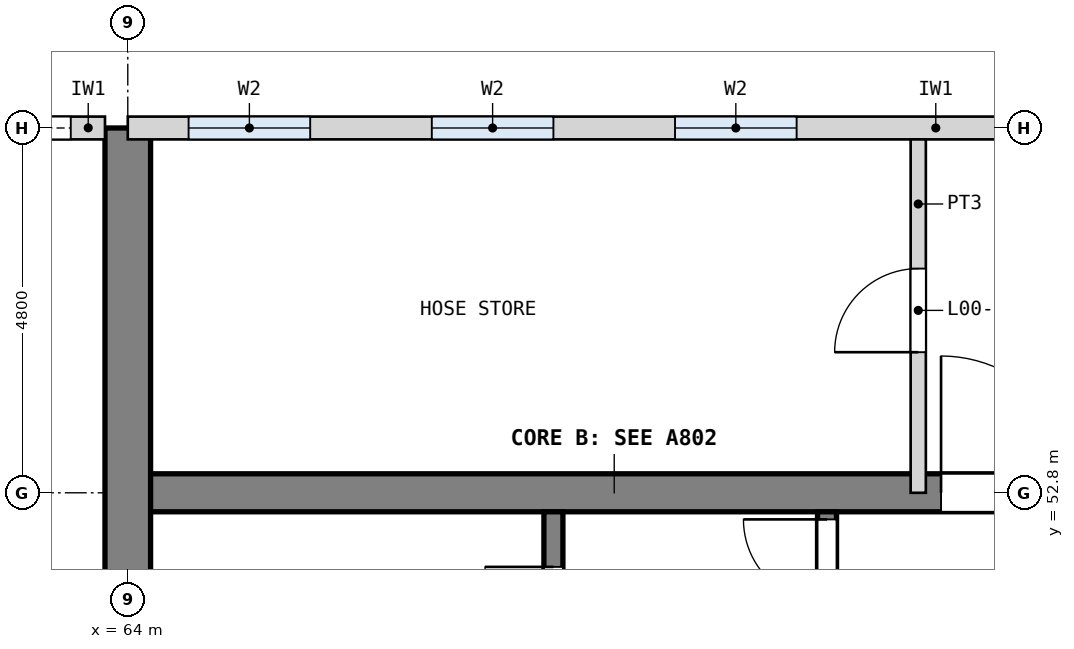
"""IFC4 building model, lengths in metres.
Left out: names, types, materials, properties, quantities, classifications, styles, units other than length and angle.
Written with IfcOpenShell. Run it as: python <this file> out.ifc"""

import sys

from ifc_helpers import new_model, si_unit, direction, frame, frame_2d, origin, place, context, subcontext, project, spatial, rectangle, extrude, element, fill, save


model = new_model("IFC4")
c1 = context("Model", 3, precision=1e-05, world=origin(), true_north=direction((0.0, 1.0)))
c2 = subcontext(c1, "Body", "Model", "MODEL_VIEW")
j1 = project(units=[si_unit("LENGTHUNIT", "METRE"), si_unit("PLANEANGLEUNIT", "RADIAN")], contexts=[c1])
p1 = place(None, origin())
s1 = spatial("IfcSite", under=j1, at=p1, CompositionType="ELEMENT")
p2 = place(p1, origin())
s2 = spatial("IfcBuilding", under=s1, at=p2, CompositionType="ELEMENT")
p3 = place(p2, origin())
s3 = spatial("IfcBuildingStorey", under=s2, at=p3, CompositionType="ELEMENT", Elevation=0.0)
p4 = place(p3, frame((63.75, 52.8, 0.0), z_axis=(0.0, 0.0, 1.0), x_axis=(1.0, 0.0, 0.0)))
e1 = element("IfcWall", 1, at=p4, inside=s3, PredefinedType="SHEAR", context=c2, shape_type="SweptSolid", body=[
    extrude(rectangle(XDim=13.3, YDim=0.5, at=frame_2d((6.65, 0.0))), origin(), (0.0, 0.0, 1.0), 4.2),
])
p5 = place(p4, frame((10.95, 0.0, 0.0)))
e2 = element("IfcOpeningElement", 2, at=p5, cuts=e1, PredefinedType="OPENING", context=c2, shape_type="SweptSolid", body=[
    extrude(rectangle(XDim=1.8, YDim=2.1, at=frame_2d((0.9, 1.05))), frame((0.0, 0.26, 0.0), z_axis=(0.0, -1.0, 0.0), x_axis=(1.0, 0.0, 0.0)), (0.0, 0.0, 1.0), 0.52),
])
p6 = place(p3, frame((64.0, 28.8, 0.0), z_axis=(0.0, 0.0, 1.0), x_axis=(0.0, 1.0, 0.0)))
e3 = element("IfcWall", 3, at=p6, inside=s3, PredefinedType="SHEAR", context=c2, shape_type="SweptSolid", body=[
    extrude(rectangle(XDim=28.8, YDim=0.6, at=frame_2d((14.4, 0.0))), origin(), (0.0, 0.0, 1.0), 4.2),
])
p7 = place(p6, frame((0.5, 0.0, 0.0)))
e4 = element("IfcOpeningElement", 4, at=p7, cuts=e3, PredefinedType="OPENING", context=c2, shape_type="SweptSolid", body=[
    extrude(rectangle(XDim=1.2, YDim=2.1, at=frame_2d((0.6, 1.05))), frame((0.0, 0.31, 0.0), z_axis=(0.0, -1.0, 0.0), x_axis=(1.0, 0.0, 0.0)), (0.0, 0.0, 1.0), 0.62),
])
p8 = place(p6, frame((3.1, 0.0, 0.0)))
e5 = element("IfcOpeningElement", 5, at=p8, cuts=e3, PredefinedType="OPENING", context=c2, shape_type="SweptSolid", body=[
    extrude(rectangle(XDim=1.2, YDim=2.1, at=frame_2d((0.6, 1.05))), frame((0.0, 0.31, 0.0), z_axis=(0.0, -1.0, 0.0), x_axis=(1.0, 0.0, 0.0)), (0.0, 0.0, 1.0), 0.62),
])
p9 = place(p3, frame((64.0, 57.6, 0.0), z_axis=(0.0, 0.0, 1.0), x_axis=(1.0, 0.0, 0.0)))
e6 = element("IfcWall", 6, at=p9, inside=s3, PredefinedType="SOLIDWALL", context=c2, shape_type="SweptSolid", body=[
    extrude(rectangle(XDim=12.45, YDim=0.3, at=frame_2d((6.225, 0.0))), origin(), (0.0, 0.0, 1.0), 3.0),
])
p10 = place(p9, frame((0.8, 0.0, 0.3)))
e7 = element("IfcOpeningElement", 7, at=p10, cuts=e6, PredefinedType="OPENING", context=c2, shape_type="SweptSolid", body=[
    extrude(rectangle(XDim=1.6, YDim=2.4, at=frame_2d((0.8, 1.2))), frame((0.0, 0.16, 0.0), z_axis=(0.0, -1.0, 0.0), x_axis=(1.0, 0.0, 0.0)), (0.0, 0.0, 1.0), 0.32),
])
p11 = place(p9, frame((4.0, 0.0, 0.3)))
e8 = element("IfcOpeningElement", 8, at=p11, cuts=e6, PredefinedType="OPENING", context=c2, shape_type="SweptSolid", body=[
    extrude(rectangle(XDim=1.6, YDim=2.4, at=frame_2d((0.8, 1.2))), frame((0.0, 0.16, 0.0), z_axis=(0.0, -1.0, 0.0), x_axis=(1.0, 0.0, 0.0)), (0.0, 0.0, 1.0), 0.32),
])
p12 = place(p9, frame((7.2, 0.0, 0.3)))
e9 = element("IfcOpeningElement", 9, at=p12, cuts=e6, PredefinedType="OPENING", context=c2, shape_type="SweptSolid", body=[
    extrude(rectangle(XDim=1.6, YDim=2.4, at=frame_2d((0.8, 1.2))), frame((0.0, 0.16, 0.0), z_axis=(0.0, -1.0, 0.0), x_axis=(1.0, 0.0, 0.0)), (0.0, 0.0, 1.0), 0.32),
])
p13 = place(p3, frame((58.4, 57.6, 0.0), z_axis=(0.0, 0.0, 1.0), x_axis=(1.0, 0.0, 0.0)))
e10 = element("IfcWall", 10, at=p13, inside=s3, PredefinedType="SOLIDWALL", context=c2, shape_type="SweptSolid", body=[
    extrude(rectangle(XDim=5.3, YDim=0.3, at=frame_2d((2.65, 0.0))), origin(), (0.0, 0.0, 1.0), 5.1),
])
p14 = place(p13, frame((0.45, 0.0, 0.0)))
e11 = element("IfcOpeningElement", 11, at=p14, cuts=e10, PredefinedType="OPENING", context=c2, shape_type="SweptSolid", body=[
    extrude(rectangle(XDim=4.4, YDim=4.5, at=frame_2d((2.2, 2.25))), frame((0.0, 0.16, 0.0), z_axis=(0.0, -1.0, 0.0), x_axis=(1.0, 0.0, 0.0)), (0.0, 0.0, 1.0), 0.32),
])
p15 = place(p3, frame((73.2, 46.475, 0.0), z_axis=(0.0, 0.0, 1.0), x_axis=(0.0, 1.0, 0.0)))
e12 = element("IfcWall", 12, at=p15, inside=s3, PredefinedType="SOLIDWALL", context=c2, shape_type="SweptSolid", body=[
    extrude(rectangle(XDim=6.075, YDim=0.25, at=frame_2d((3.038, 0.0))), origin(), (0.0, 0.0, 1.0), 3.9),
])
p16 = place(p15, frame((4.875, 0.0, 0.0)))
e13 = element("IfcOpeningElement", 13, at=p16, cuts=e12, PredefinedType="OPENING", context=c2, shape_type="SweptSolid", body=[
    extrude(rectangle(XDim=1.1, YDim=2.1, at=frame_2d((0.55, 1.05))), frame((0.0, 0.135, 0.0), z_axis=(0.0, -1.0, 0.0), x_axis=(1.0, 0.0, 0.0)), (0.0, 0.0, 1.0), 0.27),
])
p17 = place(p3, frame((69.6, 46.475, 0.0), z_axis=(0.0, 0.0, 1.0), x_axis=(0.0, 1.0, 0.0)))
e14 = element("IfcWall", 14, at=p17, inside=s3, PredefinedType="SOLIDWALL", context=c2, shape_type="SweptSolid", body=[
    extrude(rectangle(XDim=6.075, YDim=0.25, at=frame_2d((3.038, 0.0))), origin(), (0.0, 0.0, 1.0), 3.9),
])
p18 = place(p17, frame((1.312, 0.0, 0.0)))
e15 = element("IfcOpeningElement", 15, at=p18, cuts=e14, PredefinedType="OPENING", context=c2, shape_type="SweptSolid", body=[
    extrude(rectangle(XDim=1.0, YDim=2.1, at=frame_2d((0.5, 1.05))), frame((0.0, 0.135, 0.0), z_axis=(0.0, -1.0, 0.0), x_axis=(1.0, 0.0, 0.0)), (0.0, 0.0, 1.0), 0.27),
])
p19 = place(p17, frame((4.45, 0.0, 0.0)))
e16 = element("IfcOpeningElement", 16, at=p19, cuts=e14, PredefinedType="OPENING", context=c2, shape_type="SweptSolid", body=[
    extrude(rectangle(XDim=0.9, YDim=2.1, at=frame_2d((0.45, 1.05))), frame((0.0, 0.135, 0.0), z_axis=(0.0, -1.0, 0.0), x_axis=(1.0, 0.0, 0.0)), (0.0, 0.0, 1.0), 0.27),
])
p20 = place(p3, frame((74.4, 52.8, 0.0), z_axis=(0.0, 0.0, 1.0), x_axis=(0.0, 1.0, 0.0)))
e17 = element("IfcWall", 17, at=p20, inside=s3, PredefinedType="PARTITIONING", context=c2, shape_type="SweptSolid", body=[
    extrude(rectangle(XDim=4.65, YDim=0.2, at=frame_2d((2.325, 0.0))), origin(), (0.0, 0.0, 1.0), 3.9),
])
p21 = place(p20, frame((1.85, 0.0, 0.0)))
e18 = element("IfcOpeningElement", 18, at=p21, cuts=e17, PredefinedType="OPENING", context=c2, shape_type="SweptSolid", body=[
    extrude(rectangle(XDim=1.1, YDim=2.1, at=frame_2d((0.55, 1.05))), frame((0.0, 0.11, 0.0), z_axis=(0.0, -1.0, 0.0), x_axis=(1.0, 0.0, 0.0)), (0.0, 0.0, 1.0), 0.22),
])
p22 = place(p14, origin())
e19 = element("IfcDoor", 19, at=p22, inside=s3, OperationType="ROLLINGUP", PredefinedType="DOOR", context=c2, shape_type="SweptSolid", body=[
    extrude(rectangle(XDim=4.4, YDim=4.5, at=frame_2d((2.2, 2.25))), frame((0.0, 0.025, 0.0), z_axis=(0.0, -1.0, 0.0), x_axis=(1.0, 0.0, 0.0)), (0.0, 0.0, 1.0), 0.05),
])
fill(e11, e19)
p23 = place(p16, origin())
e20 = element("IfcDoor", 20, at=p23, inside=s3, OperationType="SINGLE_SWING_RIGHT", PredefinedType="DOOR", context=c2, shape_type="SweptSolid", body=[
    extrude(rectangle(XDim=1.1, YDim=2.1, at=frame_2d((0.55, 1.05))), frame((0.0, 0.025, 0.0), z_axis=(0.0, -1.0, 0.0), x_axis=(1.0, 0.0, 0.0)), (0.0, 0.0, 1.0), 0.05),
])
fill(e13, e20)
p24 = place(p19, origin())
e21 = element("IfcDoor", 21, at=p24, inside=s3, OperationType="SINGLE_SWING_RIGHT", PredefinedType="DOOR", context=c2, shape_type="SweptSolid", body=[
    extrude(rectangle(XDim=0.9, YDim=2.1, at=frame_2d((0.45, 1.05))), frame((0.0, 0.025, 0.0), z_axis=(0.0, -1.0, 0.0), x_axis=(1.0, 0.0, 0.0)), (0.0, 0.0, 1.0), 0.05),
])
fill(e16, e21)
p25 = place(p5, origin())
e22 = element("IfcDoor", 22, at=p25, inside=s3, OperationType="SINGLE_SWING_LEFT", PredefinedType="DOOR", context=c2, shape_type="SweptSolid", body=[
    extrude(rectangle(XDim=1.8, YDim=2.1, at=frame_2d((0.9, 1.05))), frame((0.0, 0.025, 0.0), z_axis=(0.0, -1.0, 0.0), x_axis=(1.0, 0.0, 0.0)), (0.0, 0.0, 1.0), 0.05),
])
fill(e2, e22)
p26 = place(p21, origin())
e23 = element("IfcDoor", 23, at=p26, inside=s3, OperationType="SINGLE_SWING_LEFT", PredefinedType="DOOR", context=c2, shape_type="SweptSolid", body=[
    extrude(rectangle(XDim=1.1, YDim=2.1, at=frame_2d((0.55, 1.05))), frame((0.0, 0.025, 0.0), z_axis=(0.0, -1.0, 0.0), x_axis=(1.0, 0.0, 0.0)), (0.0, 0.0, 1.0), 0.05),
])
fill(e18, e23)
p27 = place(p10, origin())
e24 = element("IfcWindow", 24, at=p27, inside=s3, PartitioningType="SINGLE_PANEL", PredefinedType="WINDOW", context=c2, shape_type="SweptSolid", body=[
    extrude(rectangle(XDim=1.6, YDim=2.4, at=frame_2d((0.8, 1.2))), frame((0.0, 0.03, 0.0), z_axis=(0.0, -1.0, 0.0), x_axis=(1.0, 0.0, 0.0)), (0.0, 0.0, 1.0), 0.06),
])
fill(e7, e24)
p28 = place(p11, origin())
e25 = element("IfcWindow", 25, at=p28, inside=s3, PartitioningType="SINGLE_PANEL", PredefinedType="WINDOW", context=c2, shape_type="SweptSolid", body=[
    extrude(rectangle(XDim=1.6, YDim=2.4, at=frame_2d((0.8, 1.2))), frame((0.0, 0.03, 0.0), z_axis=(0.0, -1.0, 0.0), x_axis=(1.0, 0.0, 0.0)), (0.0, 0.0, 1.0), 0.06),
])
fill(e8, e25)
p29 = place(p12, origin())
e26 = element("IfcWindow", 26, at=p29, inside=s3, PartitioningType="SINGLE_PANEL", PredefinedType="WINDOW", context=c2, shape_type="SweptSolid", body=[
    extrude(rectangle(XDim=1.6, YDim=2.4, at=frame_2d((0.8, 1.2))), frame((0.0, 0.03, 0.0), z_axis=(0.0, -1.0, 0.0), x_axis=(1.0, 0.0, 0.0)), (0.0, 0.0, 1.0), 0.06),
])
fill(e9, e26)
save(model, sys.argv[1])
